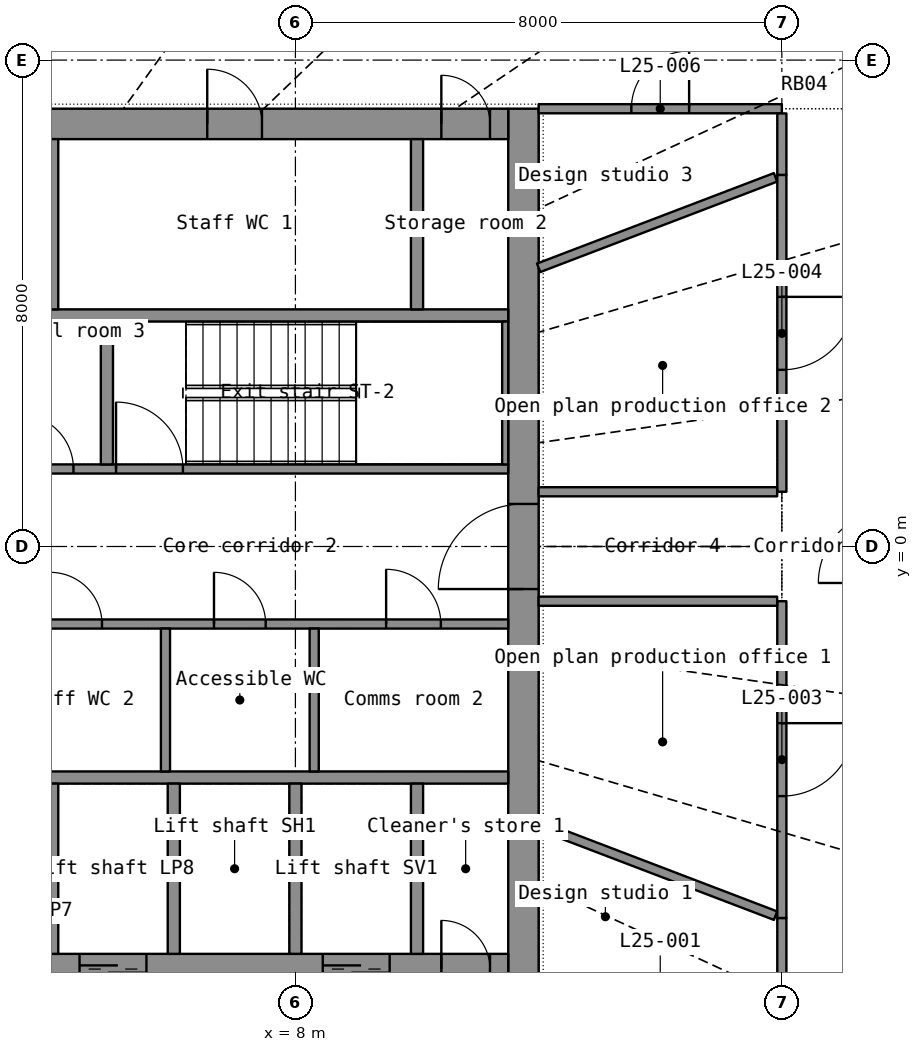
"""IFC4 building model, lengths in metres.
Left out: names, types, materials, properties, quantities, classifications, styles, units other than length and angle.
Written with IfcOpenShell. Run it as: python <this file> out.ifc"""

import sys

from ifc_helpers import new_model, si_unit, direction, frame, frame_2d, origin, place, context, subcontext, project, spatial, rectangle, extrude, element, fill, save


model = new_model("IFC4")
c1 = context("Model", 3, precision=1e-05, world=origin(), true_north=direction((0.0, 1.0)))
c2 = subcontext(c1, "Body", "Model", "MODEL_VIEW")
j1 = project(units=[si_unit("LENGTHUNIT", "METRE"), si_unit("PLANEANGLEUNIT", "RADIAN")], contexts=[c1])
p1 = place(None, origin())
s1 = spatial("IfcSite", under=j1, at=p1, CompositionType="ELEMENT")
p2 = place(p1, origin())
s2 = spatial("IfcBuilding", under=s1, at=p2, CompositionType="ELEMENT")
p3 = place(p2, frame((0.0, 0.0, 108.2)))
s3 = spatial("IfcBuildingStorey", under=s2, at=p3, CompositionType="ELEMENT", Elevation=108.2)
p4 = place(p3, frame((11.75, -7.2, 0.0), z_axis=(0.0, 0.0, 1.0), x_axis=(0.0, 1.0, 0.0)))
e1 = element("IfcWall", 1, at=p4, inside=s3, PredefinedType="SHEAR", context=c2, shape_type="SweptSolid", body=[
    extrude(rectangle(XDim=14.4, YDim=0.5, at=frame_2d((7.2, 0.0))), origin(), (0.0, 0.0, 1.0), 3.3),
])
p5 = place(p4, frame((6.5, 0.0, 0.0)))
e2 = element("IfcOpeningElement", 2, at=p5, cuts=e1, PredefinedType="OPENING", context=c2, shape_type="SweptSolid", body=[
    extrude(rectangle(XDim=1.4, YDim=2.2, at=frame_2d((0.7, 1.1))), frame((0.0, 0.26, 0.0), z_axis=(0.0, -1.0, 0.0), x_axis=(1.0, 0.0, 0.0)), (0.0, 0.0, 1.0), 0.52),
])
p6 = place(p3, frame((-11.5, -6.95, 0.0), z_axis=(0.0, 0.0, 1.0), x_axis=(1.0, 0.0, 0.0)))
e3 = element("IfcWall", 3, at=p6, inside=s3, PredefinedType="SHEAR", context=c2, shape_type="SweptSolid", body=[
    extrude(rectangle(XDim=23.0, YDim=0.5, at=frame_2d((11.5, 0.0))), origin(), (0.0, 0.0, 1.0), 3.3),
])
p7 = place(p6, frame((1.95, 0.0, 0.0)))
e4 = element("IfcOpeningElement", 4, at=p7, cuts=e3, PredefinedType="OPENING", context=c2, shape_type="SweptSolid", body=[
    extrude(rectangle(XDim=1.1, YDim=2.2, at=frame_2d((0.55, 1.1))), frame((0.0, 0.26, 0.0), z_axis=(0.0, -1.0, 0.0), x_axis=(1.0, 0.0, 0.0)), (0.0, 0.0, 1.0), 0.52),
])
p8 = place(p6, frame((3.95, 0.0, 0.0)))
e5 = element("IfcOpeningElement", 5, at=p8, cuts=e3, PredefinedType="OPENING", context=c2, shape_type="SweptSolid", body=[
    extrude(rectangle(XDim=1.1, YDim=2.2, at=frame_2d((0.55, 1.1))), frame((0.0, 0.26, 0.0), z_axis=(0.0, -1.0, 0.0), x_axis=(1.0, 0.0, 0.0)), (0.0, 0.0, 1.0), 0.52),
])
p9 = place(p6, frame((5.95, 0.0, 0.0)))
e6 = element("IfcOpeningElement", 6, at=p9, cuts=e3, PredefinedType="OPENING", context=c2, shape_type="SweptSolid", body=[
    extrude(rectangle(XDim=1.1, YDim=2.2, at=frame_2d((0.55, 1.1))), frame((0.0, 0.26, 0.0), z_axis=(0.0, -1.0, 0.0), x_axis=(1.0, 0.0, 0.0)), (0.0, 0.0, 1.0), 0.52),
])
p10 = place(p6, frame((7.95, 0.0, 0.0)))
e7 = element("IfcOpeningElement", 7, at=p10, cuts=e3, PredefinedType="OPENING", context=c2, shape_type="SweptSolid", body=[
    extrude(rectangle(XDim=1.1, YDim=2.2, at=frame_2d((0.55, 1.1))), frame((0.0, 0.26, 0.0), z_axis=(0.0, -1.0, 0.0), x_axis=(1.0, 0.0, 0.0)), (0.0, 0.0, 1.0), 0.52),
])
p11 = place(p6, frame((9.95, 0.0, 0.0)))
e8 = element("IfcOpeningElement", 8, at=p11, cuts=e3, PredefinedType="OPENING", context=c2, shape_type="SweptSolid", body=[
    extrude(rectangle(XDim=1.1, YDim=2.2, at=frame_2d((0.55, 1.1))), frame((0.0, 0.26, 0.0), z_axis=(0.0, -1.0, 0.0), x_axis=(1.0, 0.0, 0.0)), (0.0, 0.0, 1.0), 0.52),
])
p12 = place(p6, frame((11.95, 0.0, 0.0)))
e9 = element("IfcOpeningElement", 9, at=p12, cuts=e3, PredefinedType="OPENING", context=c2, shape_type="SweptSolid", body=[
    extrude(rectangle(XDim=1.1, YDim=2.2, at=frame_2d((0.55, 1.1))), frame((0.0, 0.26, 0.0), z_axis=(0.0, -1.0, 0.0), x_axis=(1.0, 0.0, 0.0)), (0.0, 0.0, 1.0), 0.52),
])
p13 = place(p6, frame((13.95, 0.0, 0.0)))
e10 = element("IfcOpeningElement", 10, at=p13, cuts=e3, PredefinedType="OPENING", context=c2, shape_type="SweptSolid", body=[
    extrude(rectangle(XDim=1.1, YDim=2.2, at=frame_2d((0.55, 1.1))), frame((0.0, 0.26, 0.0), z_axis=(0.0, -1.0, 0.0), x_axis=(1.0, 0.0, 0.0)), (0.0, 0.0, 1.0), 0.52),
])
p14 = place(p6, frame((15.95, 0.0, 0.0)))
e11 = element("IfcOpeningElement", 11, at=p14, cuts=e3, PredefinedType="OPENING", context=c2, shape_type="SweptSolid", body=[
    extrude(rectangle(XDim=1.1, YDim=2.2, at=frame_2d((0.55, 1.1))), frame((0.0, 0.26, 0.0), z_axis=(0.0, -1.0, 0.0), x_axis=(1.0, 0.0, 0.0)), (0.0, 0.0, 1.0), 0.52),
])
p15 = place(p6, frame((19.95, 0.0, 0.0)))
e12 = element("IfcOpeningElement", 12, at=p15, cuts=e3, PredefinedType="OPENING", context=c2, shape_type="SweptSolid", body=[
    extrude(rectangle(XDim=1.1, YDim=2.2, at=frame_2d((0.55, 1.1))), frame((0.0, 0.26, 0.0), z_axis=(0.0, -1.0, 0.0), x_axis=(1.0, 0.0, 0.0)), (0.0, 0.0, 1.0), 0.52),
])
p16 = place(p6, frame((0.3, 0.0, 0.0)))
e13 = element("IfcOpeningElement", 13, at=p16, cuts=e3, PredefinedType="OPENING", context=c2, shape_type="SweptSolid", body=[
    extrude(rectangle(XDim=0.8, YDim=2.05, at=frame_2d((0.4, 1.025))), frame((0.0, 0.26, 0.0), z_axis=(0.0, -1.0, 0.0), x_axis=(1.0, 0.0, 0.0)), (0.0, 0.0, 1.0), 0.52),
])
p17 = place(p6, frame((21.9, 0.0, 0.0)))
e14 = element("IfcOpeningElement", 14, at=p17, cuts=e3, PredefinedType="OPENING", context=c2, shape_type="SweptSolid", body=[
    extrude(rectangle(XDim=0.8, YDim=2.05, at=frame_2d((0.4, 1.025))), frame((0.0, 0.26, 0.0), z_axis=(0.0, -1.0, 0.0), x_axis=(1.0, 0.0, 0.0)), (0.0, 0.0, 1.0), 0.52),
])
p18 = place(p3, frame((-11.5, 6.95, 0.0), z_axis=(0.0, 0.0, 1.0), x_axis=(1.0, 0.0, 0.0)))
e15 = element("IfcWall", 15, at=p18, inside=s3, PredefinedType="SHEAR", context=c2, shape_type="SweptSolid", body=[
    extrude(rectangle(XDim=23.0, YDim=0.5, at=frame_2d((11.5, 0.0))), origin(), (0.0, 0.0, 1.0), 3.3),
])
p19 = place(p18, frame((1.95, 0.0, 0.0)))
e16 = element("IfcOpeningElement", 16, at=p19, cuts=e15, PredefinedType="OPENING", context=c2, shape_type="SweptSolid", body=[
    extrude(rectangle(XDim=1.1, YDim=2.2, at=frame_2d((0.55, 1.1))), frame((0.0, 0.26, 0.0), z_axis=(0.0, -1.0, 0.0), x_axis=(1.0, 0.0, 0.0)), (0.0, 0.0, 1.0), 0.52),
])
p20 = place(p18, frame((8.05, 0.0, 0.0)))
e17 = element("IfcOpeningElement", 17, at=p20, cuts=e15, PredefinedType="OPENING", context=c2, shape_type="SweptSolid", body=[
    extrude(rectangle(XDim=0.9, YDim=2.1, at=frame_2d((0.45, 1.05))), frame((0.0, 0.26, 0.0), z_axis=(0.0, -1.0, 0.0), x_axis=(1.0, 0.0, 0.0)), (0.0, 0.0, 1.0), 0.52),
])
p21 = place(p18, frame((13.05, 0.0, 0.0)))
e18 = element("IfcOpeningElement", 18, at=p21, cuts=e15, PredefinedType="OPENING", context=c2, shape_type="SweptSolid", body=[
    extrude(rectangle(XDim=0.9, YDim=2.1, at=frame_2d((0.45, 1.05))), frame((0.0, 0.26, 0.0), z_axis=(0.0, -1.0, 0.0), x_axis=(1.0, 0.0, 0.0)), (0.0, 0.0, 1.0), 0.52),
])
p22 = place(p18, frame((18.05, 0.0, 0.0)))
e19 = element("IfcOpeningElement", 19, at=p22, cuts=e15, PredefinedType="OPENING", context=c2, shape_type="SweptSolid", body=[
    extrude(rectangle(XDim=0.9, YDim=2.1, at=frame_2d((0.45, 1.05))), frame((0.0, 0.26, 0.0), z_axis=(0.0, -1.0, 0.0), x_axis=(1.0, 0.0, 0.0)), (0.0, 0.0, 1.0), 0.52),
])
p23 = place(p18, frame((0.3, 0.0, 0.0)))
e20 = element("IfcOpeningElement", 20, at=p23, cuts=e15, PredefinedType="OPENING", context=c2, shape_type="SweptSolid", body=[
    extrude(rectangle(XDim=0.8, YDim=2.05, at=frame_2d((0.4, 1.025))), frame((0.0, 0.26, 0.0), z_axis=(0.0, -1.0, 0.0), x_axis=(1.0, 0.0, 0.0)), (0.0, 0.0, 1.0), 0.52),
])
p24 = place(p18, frame((21.9, 0.0, 0.0)))
e21 = element("IfcOpeningElement", 21, at=p24, cuts=e15, PredefinedType="OPENING", context=c2, shape_type="SweptSolid", body=[
    extrude(rectangle(XDim=0.8, YDim=2.05, at=frame_2d((0.4, 1.025))), frame((0.0, 0.26, 0.0), z_axis=(0.0, -1.0, 0.0), x_axis=(1.0, 0.0, 0.0)), (0.0, 0.0, 1.0), 0.52),
])
for number, where, z_axis, x_axis in (
    (22, (-11.5, -3.8, 0.0), (0.0, 0.0, 1.0), (1.0, 0.0, 0.0)),
    (23, (-11.5, 3.8, 0.0), (0.0, 0.0, 1.0), (1.0, 0.0, 0.0)),
):
    element("IfcWall", number, at=place(p3, frame(where, z_axis=z_axis, x_axis=x_axis)), inside=s3, PredefinedType="SHEAR", context=c2, shape_type="SweptSolid", body=[
        extrude(rectangle(XDim=23.0, YDim=0.2, at=frame_2d((11.5, 0.0))), origin(), (0.0, 0.0, 1.0), 3.3),
    ])
for number, where, z_axis, x_axis in (
    (24, (4.0, -6.7, 0.0), (0.0, 0.0, 1.0), (0.0, 1.0, 0.0)),
    (25, (6.0, -6.7, 0.0), (0.0, 0.0, 1.0), (0.0, 1.0, 0.0)),
    (26, (8.0, -6.7, 0.0), (0.0, 0.0, 1.0), (0.0, 1.0, 0.0)),
    (27, (10.0, -6.7, 0.0), (0.0, 0.0, 1.0), (0.0, 1.0, 0.0)),
    (28, (10.0, 3.9, 0.0), (0.0, 0.0, 1.0), (0.0, 1.0, 0.0)),
):
    element("IfcWall", number, at=place(p3, frame(where, z_axis=z_axis, x_axis=x_axis)), inside=s3, PredefinedType="SHEAR", context=c2, shape_type="SweptSolid", body=[
        extrude(rectangle(XDim=2.8, YDim=0.2, at=frame_2d((1.4, 0.0))), origin(), (0.0, 0.0, 1.0), 3.3),
    ])
p25 = place(p3, frame((4.0, 3.9, 0.0), z_axis=(0.0, 0.0, 1.0), x_axis=(0.0, 1.0, 0.0)))
e29 = element("IfcWall", 29, at=p25, inside=s3, PredefinedType="PARTITIONING", context=c2, shape_type="SweptSolid", body=[
    extrude(rectangle(XDim=2.8, YDim=0.2, at=frame_2d((1.4, 0.0))), origin(), (0.0, 0.0, 1.0), 3.3),
])
p26 = place(p3, frame((3.0, -1.275, 0.0), z_axis=(0.0, 0.0, 1.0), x_axis=(1.0, 0.0, 0.0)))
e30 = element("IfcWall", 30, at=p26, inside=s3, PredefinedType="PARTITIONING", context=c2, shape_type="SweptSolid", body=[
    extrude(rectangle(XDim=8.5, YDim=0.15, at=frame_2d((4.25, 0.0))), origin(), (0.0, 0.0, 1.0), 3.3),
])
p27 = place(p26, frame((0.969, 0.0, 0.0)))
e31 = element("IfcOpeningElement", 31, at=p27, cuts=e30, PredefinedType="OPENING", context=c2, shape_type="SweptSolid", body=[
    extrude(rectangle(XDim=0.85, YDim=2.1, at=frame_2d((0.425, 1.05))), frame((0.0, 0.085, 0.0), z_axis=(0.0, -1.0, 0.0), x_axis=(1.0, 0.0, 0.0)), (0.0, 0.0, 1.0), 0.17),
])
p28 = place(p26, frame((3.661, 0.0, 0.0)))
e32 = element("IfcOpeningElement", 32, at=p28, cuts=e30, PredefinedType="OPENING", context=c2, shape_type="SweptSolid", body=[
    extrude(rectangle(XDim=0.85, YDim=2.1, at=frame_2d((0.425, 1.05))), frame((0.0, 0.085, 0.0), z_axis=(0.0, -1.0, 0.0), x_axis=(1.0, 0.0, 0.0)), (0.0, 0.0, 1.0), 0.17),
])
p29 = place(p26, frame((6.492, 0.0, 0.0)))
e33 = element("IfcOpeningElement", 33, at=p29, cuts=e30, PredefinedType="OPENING", context=c2, shape_type="SweptSolid", body=[
    extrude(rectangle(XDim=0.9, YDim=2.1, at=frame_2d((0.45, 1.05))), frame((0.0, 0.085, 0.0), z_axis=(0.0, -1.0, 0.0), x_axis=(1.0, 0.0, 0.0)), (0.0, 0.0, 1.0), 0.17),
])
p30 = place(p3, frame((3.0, 1.275, 0.0), z_axis=(0.0, 0.0, 1.0), x_axis=(1.0, 0.0, 0.0)))
e34 = element("IfcWall", 34, at=p30, inside=s3, PredefinedType="SHEAR", context=c2, shape_type="SweptSolid", body=[
    extrude(rectangle(XDim=8.5, YDim=0.15, at=frame_2d((4.25, 0.0))), origin(), (0.0, 0.0, 1.0), 3.3),
])
p31 = place(p30, frame((2.05, 0.0, 0.0)))
e35 = element("IfcOpeningElement", 35, at=p31, cuts=e34, PredefinedType="OPENING", context=c2, shape_type="SweptSolid", body=[
    extrude(rectangle(XDim=1.1, YDim=2.15, at=frame_2d((0.55, 1.075))), frame((0.0, 0.085, 0.0), z_axis=(0.0, -1.0, 0.0), x_axis=(1.0, 0.0, 0.0)), (0.0, 0.0, 1.0), 0.17),
])
p32 = place(p30, frame((0.45, 0.0, 0.0)))
e36 = element("IfcOpeningElement", 36, at=p32, cuts=e34, PredefinedType="OPENING", context=c2, shape_type="SweptSolid", body=[
    extrude(rectangle(XDim=0.9, YDim=2.1, at=frame_2d((0.45, 1.05))), frame((0.0, 0.085, 0.0), z_axis=(0.0, -1.0, 0.0), x_axis=(1.0, 0.0, 0.0)), (0.0, 0.0, 1.0), 0.17),
])
p33 = place(p3, frame((11.45, 1.35, 0.0), z_axis=(0.0, 0.0, 1.0), x_axis=(0.0, 1.0, 0.0)))
e37 = element("IfcWall", 37, at=p33, inside=s3, PredefinedType="SHEAR", context=c2, shape_type="SweptSolid", body=[
    extrude(rectangle(XDim=2.35, YDim=0.1, at=frame_2d((1.175, 0.0))), origin(), (0.0, 0.0, 1.0), 3.3),
])
p34 = place(p3, frame((4.9, 1.35, 0.0), z_axis=(0.0, 0.0, 1.0), x_axis=(0.0, 1.0, 0.0)))
e38 = element("IfcWall", 38, at=p34, inside=s3, PredefinedType="SHEAR", context=c2, shape_type="SweptSolid", body=[
    extrude(rectangle(XDim=2.35, YDim=0.2, at=frame_2d((1.175, 0.0))), origin(), (0.0, 0.0, 1.0), 3.3),
])
for number, where, z_axis, x_axis in (
    (39, (5.863, -3.7, 0.0), (0.0, 0.0, 1.0), (0.0, 1.0, 0.0)),
    (40, (8.309, -3.7, 0.0), (0.0, 0.0, 1.0), (0.0, 1.0, 0.0)),
):
    element("IfcWall", number, at=place(p3, frame(where, z_axis=z_axis, x_axis=x_axis)), inside=s3, PredefinedType="PARTITIONING", context=c2, shape_type="SweptSolid", body=[
        extrude(rectangle(XDim=2.35, YDim=0.15, at=frame_2d((1.175, 0.0))), origin(), (0.0, 0.0, 1.0), 3.3),
    ])
p35 = place(p3, frame((16.0, -0.9, 0.0), z_axis=(0.0, 0.0, 1.0), x_axis=(0.0, -1.0, 0.0)))
e41 = element("IfcWall", 41, at=p35, inside=s3, PredefinedType="PARTITIONING", context=c2, shape_type="SweptSolid", body=[
    extrude(rectangle(XDim=5.211, YDim=0.15, at=frame_2d((2.606, 0.0))), origin(), (0.0, 0.0, 1.0), 2.4),
])
p36 = place(p35, frame((2.006, 0.0, 0.0)))
e42 = element("IfcOpeningElement", 42, at=p36, cuts=e41, PredefinedType="OPENING", context=c2, shape_type="SweptSolid", body=[
    extrude(rectangle(XDim=1.2, YDim=2.2, at=frame_2d((0.6, 1.1))), frame((0.0, 0.085, 0.0), z_axis=(0.0, -1.0, 0.0), x_axis=(1.0, 0.0, 0.0)), (0.0, 0.0, 1.0), 0.17),
])
p37 = place(p3, frame((16.0, 6.111, 0.0), z_axis=(0.0, 0.0, 1.0), x_axis=(0.0, -1.0, 0.0)))
e43 = element("IfcWall", 43, at=p37, inside=s3, PredefinedType="PARTITIONING", context=c2, shape_type="SweptSolid", body=[
    extrude(rectangle(XDim=5.211, YDim=0.15, at=frame_2d((2.606, 0.0))), origin(), (0.0, 0.0, 1.0), 2.4),
])
p38 = place(p37, frame((2.006, 0.0, 0.0)))
e44 = element("IfcOpeningElement", 44, at=p38, cuts=e43, PredefinedType="OPENING", context=c2, shape_type="SweptSolid", body=[
    extrude(rectangle(XDim=1.2, YDim=2.2, at=frame_2d((0.6, 1.1))), frame((0.0, 0.085, 0.0), z_axis=(0.0, -1.0, 0.0), x_axis=(1.0, 0.0, 0.0)), (0.0, 0.0, 1.0), 0.17),
])
for number, where, z_axis, x_axis in (
    (45, (15.896, -6.072, 0.0), (0.0, 0.0, 1.0), (-0.934, 0.357, 0.0)),
    (46, (15.896, 6.072, 0.0), (0.0, 0.0, 1.0), (-0.934, -0.357, 0.0)),
):
    element("IfcWall", number, at=place(p3, frame(where, z_axis=z_axis, x_axis=x_axis)), inside=s3, PredefinedType="PARTITIONING", context=c2, shape_type="SweptSolid", body=[
        extrude(rectangle(XDim=4.171, YDim=0.15, at=frame_2d((2.085, 0.0))), origin(), (0.0, 0.0, 1.0), 2.4),
    ])
p39 = place(p3, frame((12.0, -0.9, 0.0), z_axis=(0.0, 0.0, 1.0), x_axis=(1.0, 0.0, 0.0)))
e47 = element("IfcWall", 47, at=p39, inside=s3, PredefinedType="PARTITIONING", context=c2, shape_type="SweptSolid", body=[
    extrude(rectangle(XDim=3.923, YDim=0.15, at=frame_2d((1.961, 0.0))), origin(), (0.0, 0.0, 1.0), 2.4),
])
p40 = place(p3, frame((12.0, 7.2, 0.0), z_axis=(0.0, 0.0, 1.0), x_axis=(1.0, 0.0, 0.0)))
e48 = element("IfcWall", 48, at=p40, inside=s3, PredefinedType="PARTITIONING", context=c2, shape_type="SweptSolid", body=[
    extrude(rectangle(XDim=4.0, YDim=0.15, at=frame_2d((2.0, 0.0))), origin(), (0.0, 0.0, 1.0), 2.4),
])
p41 = place(p40, frame((1.525, 0.0, 0.0)))
e49 = element("IfcOpeningElement", 49, at=p41, cuts=e48, PredefinedType="OPENING", context=c2, shape_type="SweptSolid", body=[
    extrude(rectangle(XDim=0.95, YDim=2.15, at=frame_2d((0.475, 1.075))), frame((0.0, 0.085, 0.0), z_axis=(0.0, -1.0, 0.0), x_axis=(1.0, 0.0, 0.0)), (0.0, 0.0, 1.0), 0.17),
])
p42 = place(p3, frame((15.923, 0.9, 0.0), z_axis=(0.0, 0.0, 1.0), x_axis=(-1.0, 0.0, 0.0)))
e50 = element("IfcWall", 50, at=p42, inside=s3, PredefinedType="PARTITIONING", context=c2, shape_type="SweptSolid", body=[
    extrude(rectangle(XDim=3.923, YDim=0.15, at=frame_2d((1.961, 0.0))), origin(), (0.0, 0.0, 1.0), 2.4),
])
for number, where, z_axis, x_axis in (
    (51, (16.0, -6.112, 0.0), (0.0, 0.0, 1.0), (0.0, -1.0, 0.0)),
    (52, (16.0, 7.123, 0.0), (0.0, 0.0, 1.0), (0.0, -1.0, 0.0)),
):
    element("IfcWall", number, at=place(p3, frame(where, z_axis=z_axis, x_axis=x_axis)), inside=s3, PredefinedType="PARTITIONING", context=c2, shape_type="SweptSolid", body=[
        extrude(rectangle(XDim=1.011, YDim=0.15, at=frame_2d((0.505, 0.0))), origin(), (0.0, 0.0, 1.0), 2.4),
    ])
p43 = place(p14, origin())
e53 = element("IfcDoor", 53, at=p43, inside=s3, OperationType="DOUBLE_DOOR_SLIDING", PredefinedType="DOOR", context=c2, shape_type="SweptSolid", body=[
    extrude(rectangle(XDim=1.1, YDim=2.2, at=frame_2d((0.55, 1.1))), frame((0.0, 0.025, 0.0), z_axis=(0.0, -1.0, 0.0), x_axis=(1.0, 0.0, 0.0)), (0.0, 0.0, 1.0), 0.05),
])
fill(e11, e53)
p44 = place(p15, origin())
e54 = element("IfcDoor", 54, at=p44, inside=s3, OperationType="DOUBLE_DOOR_SLIDING", PredefinedType="DOOR", context=c2, shape_type="SweptSolid", body=[
    extrude(rectangle(XDim=1.1, YDim=2.2, at=frame_2d((0.55, 1.1))), frame((0.0, 0.025, 0.0), z_axis=(0.0, -1.0, 0.0), x_axis=(1.0, 0.0, 0.0)), (0.0, 0.0, 1.0), 0.05),
])
fill(e12, e54)
p45 = place(p17, origin())
e55 = element("IfcDoor", 55, at=p45, inside=s3, OperationType="SINGLE_SWING_LEFT", PredefinedType="DOOR", context=c2, shape_type="SweptSolid", body=[
    extrude(rectangle(XDim=0.8, YDim=2.05, at=frame_2d((0.4, 1.025))), frame((0.0, 0.025, 0.0), z_axis=(0.0, -1.0, 0.0), x_axis=(1.0, 0.0, 0.0)), (0.0, 0.0, 1.0), 0.05),
])
fill(e14, e55)
p46 = place(p22, origin())
e56 = element("IfcDoor", 56, at=p46, inside=s3, OperationType="SINGLE_SWING_LEFT", PredefinedType="DOOR", context=c2, shape_type="SweptSolid", body=[
    extrude(rectangle(XDim=0.9, YDim=2.1, at=frame_2d((0.45, 1.05))), frame((0.0, 0.025, 0.0), z_axis=(0.0, -1.0, 0.0), x_axis=(1.0, 0.0, 0.0)), (0.0, 0.0, 1.0), 0.05),
])
fill(e19, e56)
p47 = place(p24, origin())
e57 = element("IfcDoor", 57, at=p47, inside=s3, OperationType="SINGLE_SWING_LEFT", PredefinedType="DOOR", context=c2, shape_type="SweptSolid", body=[
    extrude(rectangle(XDim=0.8, YDim=2.05, at=frame_2d((0.4, 1.025))), frame((0.0, 0.025, 0.0), z_axis=(0.0, -1.0, 0.0), x_axis=(1.0, 0.0, 0.0)), (0.0, 0.0, 1.0), 0.05),
])
fill(e21, e57)
p48 = place(p5, origin())
e58 = element("IfcDoor", 58, at=p48, inside=s3, OperationType="DOUBLE_DOOR_SINGLE_SWING", PredefinedType="DOOR", context=c2, shape_type="SweptSolid", body=[
    extrude(rectangle(XDim=1.4, YDim=2.2, at=frame_2d((0.7, 1.1))), frame((0.0, 0.025, 0.0), z_axis=(0.0, -1.0, 0.0), x_axis=(1.0, 0.0, 0.0)), (0.0, 0.0, 1.0), 0.05),
])
fill(e2, e58)
p49 = place(p31, origin())
e59 = element("IfcDoor", 59, at=p49, inside=s3, OperationType="SINGLE_SWING_LEFT", PredefinedType="DOOR", context=c2, shape_type="SweptSolid", body=[
    extrude(rectangle(XDim=1.1, YDim=2.15, at=frame_2d((0.55, 1.075))), frame((0.0, 0.025, 0.0), z_axis=(0.0, -1.0, 0.0), x_axis=(1.0, 0.0, 0.0)), (0.0, 0.0, 1.0), 0.05),
])
fill(e35, e59)
p50 = place(p27, origin())
e60 = element("IfcDoor", 60, at=p50, inside=s3, OperationType="SINGLE_SWING_LEFT", PredefinedType="DOOR", context=c2, shape_type="SweptSolid", body=[
    extrude(rectangle(XDim=0.85, YDim=2.1, at=frame_2d((0.425, 1.05))), frame((0.0, 0.025, 0.0), z_axis=(0.0, -1.0, 0.0), x_axis=(1.0, 0.0, 0.0)), (0.0, 0.0, 1.0), 0.05),
])
fill(e31, e60)
p51 = place(p28, origin())
e61 = element("IfcDoor", 61, at=p51, inside=s3, OperationType="SINGLE_SWING_LEFT", PredefinedType="DOOR", context=c2, shape_type="SweptSolid", body=[
    extrude(rectangle(XDim=0.85, YDim=2.1, at=frame_2d((0.425, 1.05))), frame((0.0, 0.025, 0.0), z_axis=(0.0, -1.0, 0.0), x_axis=(1.0, 0.0, 0.0)), (0.0, 0.0, 1.0), 0.05),
])
fill(e32, e61)
p52 = place(p29, origin())
e62 = element("IfcDoor", 62, at=p52, inside=s3, OperationType="SINGLE_SWING_LEFT", PredefinedType="DOOR", context=c2, shape_type="SweptSolid", body=[
    extrude(rectangle(XDim=0.9, YDim=2.1, at=frame_2d((0.45, 1.05))), frame((0.0, 0.025, 0.0), z_axis=(0.0, -1.0, 0.0), x_axis=(1.0, 0.0, 0.0)), (0.0, 0.0, 1.0), 0.05),
])
fill(e33, e62)
p53 = place(p32, origin())
e63 = element("IfcDoor", 63, at=p53, inside=s3, OperationType="SINGLE_SWING_LEFT", PredefinedType="DOOR", context=c2, shape_type="SweptSolid", body=[
    extrude(rectangle(XDim=0.9, YDim=2.1, at=frame_2d((0.45, 1.05))), frame((0.0, 0.025, 0.0), z_axis=(0.0, -1.0, 0.0), x_axis=(1.0, 0.0, 0.0)), (0.0, 0.0, 1.0), 0.05),
])
fill(e36, e63)
p54 = place(p36, origin())
e64 = element("IfcDoor", 64, at=p54, inside=s3, OperationType="DOUBLE_DOOR_SINGLE_SWING", PredefinedType="DOOR", context=c2, shape_type="SweptSolid", body=[
    extrude(rectangle(XDim=1.2, YDim=2.2, at=frame_2d((0.6, 1.1))), frame((0.0, 0.025, 0.0), z_axis=(0.0, -1.0, 0.0), x_axis=(1.0, 0.0, 0.0)), (0.0, 0.0, 1.0), 0.05),
])
fill(e42, e64)
p55 = place(p38, origin())
e65 = element("IfcDoor", 65, at=p55, inside=s3, OperationType="DOUBLE_DOOR_SINGLE_SWING", PredefinedType="DOOR", context=c2, shape_type="SweptSolid", body=[
    extrude(rectangle(XDim=1.2, YDim=2.2, at=frame_2d((0.6, 1.1))), frame((0.0, 0.025, 0.0), z_axis=(0.0, -1.0, 0.0), x_axis=(1.0, 0.0, 0.0)), (0.0, 0.0, 1.0), 0.05),
])
fill(e44, e65)
p56 = place(p41, origin())
e66 = element("IfcDoor", 66, at=p56, inside=s3, OperationType="SINGLE_SWING_RIGHT", PredefinedType="DOOR", context=c2, shape_type="SweptSolid", body=[
    extrude(rectangle(XDim=0.95, YDim=2.15, at=frame_2d((0.475, 1.075))), frame((0.0, 0.025, 0.0), z_axis=(0.0, -1.0, 0.0), x_axis=(1.0, 0.0, 0.0)), (0.0, 0.0, 1.0), 0.05),
])
fill(e49, e66)
save(model, sys.argv[1])
